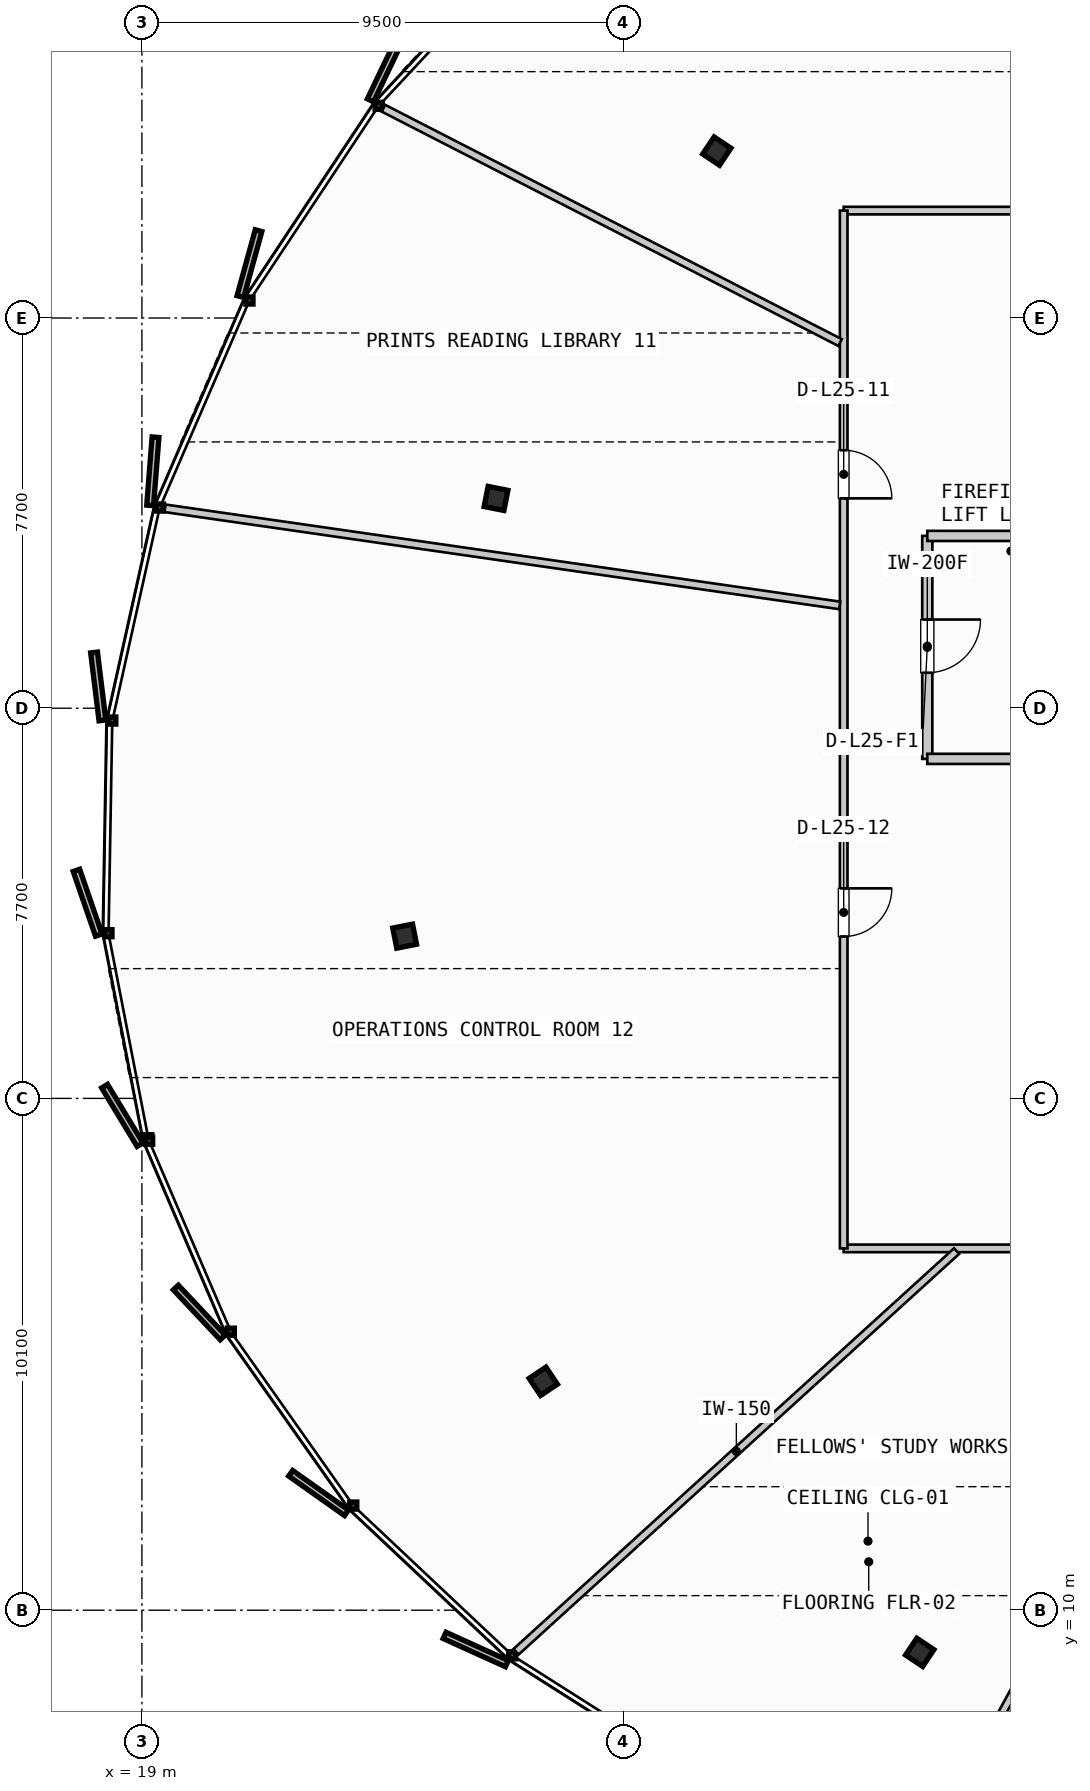
"""IFC4 building model, lengths in metres.
Left out: names, types, materials, properties, quantities, classifications, styles, units other than length and angle.
Written with IfcOpenShell. Run it as: python <this file> out.ifc"""

import sys

from ifc_helpers import new_model, si_unit, direction, frame, frame_2d, origin, origin_2d, place, context, subcontext, project, spatial, rectangle, i_section, extrude, source, transform, mapped, element, fill, save


model = new_model("IFC4")
c1 = context("Model", 3, precision=1e-05, world=origin(), true_north=direction((0.0, 1.0)))
c2 = subcontext(c1, "Body", "Model", "MODEL_VIEW")
j1 = project(units=[si_unit("LENGTHUNIT", "METRE"), si_unit("PLANEANGLEUNIT", "RADIAN")], contexts=[c1])
p1 = place(None, origin())
s1 = spatial("IfcSite", under=j1, at=p1, CompositionType="ELEMENT")
p2 = place(p1, origin())
s2 = spatial("IfcBuilding", under=s1, at=p2, CompositionType="ELEMENT")
p3 = place(p2, frame((0.0, 0.0, 103.6)))
s3 = spatial("IfcBuildingStorey", under=s2, at=p3, CompositionType="ELEMENT", Elevation=103.6)
m1 = source(origin(), c2, "Body", "SweptSolid", [
    extrude(i_section(OverallWidth=0.405, OverallDepth=0.398, WebThickness=0.035, FlangeThickness=0.056, FilletRadius=0.015, at=origin_2d()), origin(), (0.0, 0.0, 1.0), 3.35),
])
for number, where, z_axis, x_axis in (
    (1, (30.346, 38.794, 0.0), (0.0, 0.0, 1.0), (-0.831, 0.556, 0.0)),
    (2, (25.989, 31.94, 0.0), (0.0, 0.0, 1.0), (-0.981, 0.195, 0.0)),
    (3, (24.185, 23.302, 0.0), (0.0, 0.0, 1.0), (-0.981, -0.195, 0.0)),
    (4, (26.921, 14.517, 0.0), (0.0, 0.0, 1.0), (-0.831, -0.556, 0.0)),
    (5, (34.351, 9.168, 0.0), (0.0, 0.0, 1.0), (-0.556, -0.831, 0.0)),
):
    element("IfcColumn", number, at=place(p3, frame(where, z_axis=z_axis, x_axis=x_axis)), inside=s3, PredefinedType="COLUMN", context=c2, shape_type="MappedRepresentation", body=[
        mapped(m1, transform((0.0, 0.0, 0.0), scale=1.0)),
    ])
p4 = place(p3, frame((34.5, 31.2, 0.0), z_axis=(0.0, 0.0, 1.0), x_axis=(0.0, -1.0, 0.0)))
e6 = element("IfcWall", 6, at=p4, inside=s3, PredefinedType="PARTITIONING", context=c2, shape_type="SweptSolid", body=[
    extrude(rectangle(XDim=4.4, YDim=0.2, at=frame_2d((2.2, 0.0))), origin(), (0.0, 0.0, 1.0), 2.28),
])
p5 = place(p4, frame((1.65, 0.0, 0.0)))
e7 = element("IfcOpeningElement", 7, at=p5, cuts=e6, PredefinedType="OPENING", context=c2, shape_type="SweptSolid", body=[
    extrude(rectangle(XDim=1.05, YDim=2.15, at=frame_2d((0.525, 1.075))), frame((0.0, 0.11, 0.0), z_axis=(0.0, -1.0, 0.0), x_axis=(1.0, 0.0, 0.0)), (0.0, 0.0, 1.0), 0.22),
])
for number, where, z_axis, x_axis in (
    (8, (34.5, 26.8, 0.0), (0.0, 0.0, 1.0), (1.0, 0.0, 0.0)),
    (9, (34.5, 31.2, 0.0), (0.0, 0.0, 1.0), (1.0, 0.0, 0.0)),
):
    element("IfcWall", number, at=place(p3, frame(where, z_axis=z_axis, x_axis=x_axis)), inside=s3, PredefinedType="PARTITIONING", context=c2, shape_type="SweptSolid", body=[
        extrude(rectangle(XDim=3.215, YDim=0.2, at=frame_2d((1.607, 0.0))), origin(), (0.0, 0.0, 1.0), 2.28),
    ])
p6 = place(p3, frame((32.85, 17.14, 0.0), z_axis=(0.0, 0.0, 1.0), x_axis=(1.0, 0.0, 0.0)))
e10 = element("IfcWall", 10, at=p6, inside=s3, PredefinedType="PARTITIONING", context=c2, shape_type="SweptSolid", body=[
    extrude(rectangle(XDim=28.42, YDim=0.15, at=frame_2d((14.21, 0.0))), origin(), (0.0, 0.0, 1.0), 2.28),
])
p7 = place(p6, frame((4.674, 0.0, 0.0)))
e11 = element("IfcOpeningElement", 11, at=p7, cuts=e10, PredefinedType="OPENING", context=c2, shape_type="SweptSolid", body=[
    extrude(rectangle(XDim=0.95, YDim=2.15, at=frame_2d((0.475, 1.075))), frame((0.0, 0.085, 0.0), z_axis=(0.0, -1.0, 0.0), x_axis=(1.0, 0.0, 0.0)), (0.0, 0.0, 1.0), 0.17),
])
p8 = place(p6, frame((12.2, 0.0, 0.0)))
e12 = element("IfcOpeningElement", 12, at=p8, cuts=e10, PredefinedType="OPENING", context=c2, shape_type="SweptSolid", body=[
    extrude(rectangle(XDim=0.95, YDim=2.15, at=frame_2d((0.475, 1.075))), frame((0.0, 0.085, 0.0), z_axis=(0.0, -1.0, 0.0), x_axis=(1.0, 0.0, 0.0)), (0.0, 0.0, 1.0), 0.17),
])
p9 = place(p6, frame((22.06, 0.0, 0.0)))
e13 = element("IfcOpeningElement", 13, at=p9, cuts=e10, PredefinedType="OPENING", context=c2, shape_type="SweptSolid", body=[
    extrude(rectangle(XDim=0.95, YDim=2.15, at=frame_2d((0.475, 1.075))), frame((0.0, 0.085, 0.0), z_axis=(0.0, -1.0, 0.0), x_axis=(1.0, 0.0, 0.0)), (0.0, 0.0, 1.0), 0.17),
])
p10 = place(p3, frame((61.27, 37.62, 0.0), z_axis=(0.0, 0.0, 1.0), x_axis=(-1.0, 0.0, 0.0)))
e14 = element("IfcWall", 14, at=p10, inside=s3, PredefinedType="PARTITIONING", context=c2, shape_type="SweptSolid", body=[
    extrude(rectangle(XDim=28.42, YDim=0.15, at=frame_2d((14.21, 0.0))), origin(), (0.0, 0.0, 1.0), 2.28),
])
p11 = place(p10, frame((5.539, 0.0, 0.0)))
e15 = element("IfcOpeningElement", 15, at=p11, cuts=e14, PredefinedType="OPENING", context=c2, shape_type="SweptSolid", body=[
    extrude(rectangle(XDim=0.95, YDim=2.15, at=frame_2d((0.475, 1.075))), frame((0.0, 0.085, 0.0), z_axis=(0.0, -1.0, 0.0), x_axis=(1.0, 0.0, 0.0)), (0.0, 0.0, 1.0), 0.17),
])
p12 = place(p10, frame((10.574, 0.0, 0.0)))
e16 = element("IfcOpeningElement", 16, at=p12, cuts=e14, PredefinedType="OPENING", context=c2, shape_type="SweptSolid", body=[
    extrude(rectangle(XDim=0.95, YDim=2.15, at=frame_2d((0.475, 1.075))), frame((0.0, 0.085, 0.0), z_axis=(0.0, -1.0, 0.0), x_axis=(1.0, 0.0, 0.0)), (0.0, 0.0, 1.0), 0.17),
])
p13 = place(p10, frame((16.148, 0.0, 0.0)))
e17 = element("IfcOpeningElement", 17, at=p13, cuts=e14, PredefinedType="OPENING", context=c2, shape_type="SweptSolid", body=[
    extrude(rectangle(XDim=0.95, YDim=2.15, at=frame_2d((0.475, 1.075))), frame((0.0, 0.085, 0.0), z_axis=(0.0, -1.0, 0.0), x_axis=(1.0, 0.0, 0.0)), (0.0, 0.0, 1.0), 0.17),
])
p14 = place(p10, frame((23.429, 0.0, 0.0)))
e18 = element("IfcOpeningElement", 18, at=p14, cuts=e14, PredefinedType="OPENING", context=c2, shape_type="SweptSolid", body=[
    extrude(rectangle(XDim=0.95, YDim=2.15, at=frame_2d((0.475, 1.075))), frame((0.0, 0.085, 0.0), z_axis=(0.0, -1.0, 0.0), x_axis=(1.0, 0.0, 0.0)), (0.0, 0.0, 1.0), 0.17),
])
p15 = place(p3, frame((32.85, 37.62, 0.0), z_axis=(0.0, 0.0, 1.0), x_axis=(0.0, -1.0, 0.0)))
e19 = element("IfcWall", 19, at=p15, inside=s3, PredefinedType="PARTITIONING", context=c2, shape_type="SweptSolid", body=[
    extrude(rectangle(XDim=20.48, YDim=0.15, at=frame_2d((10.24, 0.0))), origin(), (0.0, 0.0, 1.0), 2.28),
])
p16 = place(p15, frame((4.729, 0.0, 0.0)))
e20 = element("IfcOpeningElement", 20, at=p16, cuts=e19, PredefinedType="OPENING", context=c2, shape_type="SweptSolid", body=[
    extrude(rectangle(XDim=0.95, YDim=2.15, at=frame_2d((0.475, 1.075))), frame((0.0, 0.085, 0.0), z_axis=(0.0, -1.0, 0.0), x_axis=(1.0, 0.0, 0.0)), (0.0, 0.0, 1.0), 0.17),
])
p17 = place(p15, frame((13.375, 0.0, 0.0)))
e21 = element("IfcOpeningElement", 21, at=p17, cuts=e19, PredefinedType="OPENING", context=c2, shape_type="SweptSolid", body=[
    extrude(rectangle(XDim=0.95, YDim=2.15, at=frame_2d((0.475, 1.075))), frame((0.0, 0.085, 0.0), z_axis=(0.0, -1.0, 0.0), x_axis=(1.0, 0.0, 0.0)), (0.0, 0.0, 1.0), 0.17),
])
p18 = place(p3, frame((35.078, 17.086, 0.0), z_axis=(0.0, 0.0, 1.0), x_axis=(-0.739815961322, -0.672809291979, 0.0)))
e22 = element("IfcWall", 22, at=p18, inside=s3, PredefinedType="PARTITIONING", context=c2, shape_type="SweptSolid", body=[
    extrude(rectangle(XDim=11.75, YDim=0.15, at=frame_2d((5.875, 0.0))), origin(), (0.0, 0.0, 1.0), 2.28),
])
p19 = place(p3, frame((40.958, 17.07, 0.0), z_axis=(0.0, 0.0, 1.0), x_axis=(-0.480174097986, -0.877173207311, 0.0)))
e23 = element("IfcWall", 23, at=p19, inside=s3, PredefinedType="PARTITIONING", context=c2, shape_type="SweptSolid", body=[
    extrude(rectangle(XDim=13.684, YDim=0.15, at=frame_2d((6.842, 0.0))), origin(), (0.0, 0.0, 1.0), 2.28),
])
p20 = place(p3, frame((41.264, 37.69, 0.0), z_axis=(0.0, 0.0, 1.0), x_axis=(-0.488413419201, 0.872612360642, 0.0)))
e24 = element("IfcWall", 24, at=p20, inside=s3, PredefinedType="PARTITIONING", context=c2, shape_type="SweptSolid", body=[
    extrude(rectangle(XDim=12.447, YDim=0.15, at=frame_2d((6.223, 0.0))), origin(), (0.0, 0.0, 1.0), 2.28),
])
p21 = place(p3, frame((32.779, 35.016, 0.0), z_axis=(0.0, 0.0, 1.0), x_axis=(-0.889722087062, 0.456502582461, 0.0)))
e25 = element("IfcWall", 25, at=p21, inside=s3, PredefinedType="PARTITIONING", context=c2, shape_type="SweptSolid", body=[
    extrude(rectangle(XDim=10.129, YDim=0.15, at=frame_2d((5.064, 0.0))), origin(), (0.0, 0.0, 1.0), 2.28),
])
p22 = place(p3, frame((32.771, 29.829, 0.0), z_axis=(0.0, 0.0, 1.0), x_axis=(-0.989796466172, 0.142488440067, 0.0)))
e26 = element("IfcWall", 26, at=p22, inside=s3, PredefinedType="PARTITIONING", context=c2, shape_type="SweptSolid", body=[
    extrude(rectangle(XDim=13.452, YDim=0.15, at=frame_2d((6.726, 0.0))), origin(), (0.0, 0.0, 1.0), 2.28),
])
m2 = source(origin(), c2, "Body", "SweptSolid", [
    extrude(rectangle(XDim=1.05, YDim=2.15, at=frame_2d((0.525, 1.075))), frame((0.0, 0.025, 0.0), z_axis=(0.0, -1.0, 0.0), x_axis=(1.0, 0.0, 0.0)), (0.0, 0.0, 1.0), 0.05),
])
p23 = place(p5, origin())
e27 = element("IfcDoor", 27, at=p23, inside=s3, OperationType="SINGLE_SWING_LEFT", PredefinedType="DOOR", context=c2, shape_type="MappedRepresentation", body=[
    mapped(m2, transform((0.0, 0.0, 0.0), scale=1.0)),
])
fill(e7, e27)
m3 = source(origin(), c2, "Body", "SweptSolid", [
    extrude(rectangle(XDim=0.95, YDim=2.15, at=frame_2d((0.475, 1.075))), frame((0.0, 0.025, 0.0), z_axis=(0.0, -1.0, 0.0), x_axis=(1.0, 0.0, 0.0)), (0.0, 0.0, 1.0), 0.05),
])
p24 = place(p16, origin())
e28 = element("IfcDoor", 28, at=p24, inside=s3, OperationType="SINGLE_SWING_RIGHT", PredefinedType="DOOR", context=c2, shape_type="MappedRepresentation", body=[
    mapped(m3, transform((0.0, 0.0, 0.0), scale=1.0)),
])
fill(e20, e28)
p25 = place(p17, origin())
e29 = element("IfcDoor", 29, at=p25, inside=s3, OperationType="SINGLE_SWING_LEFT", PredefinedType="DOOR", context=c2, shape_type="MappedRepresentation", body=[
    mapped(m3, transform((0.0, 0.0, 0.0), scale=1.0)),
])
fill(e21, e29)
save(model, sys.argv[1])
